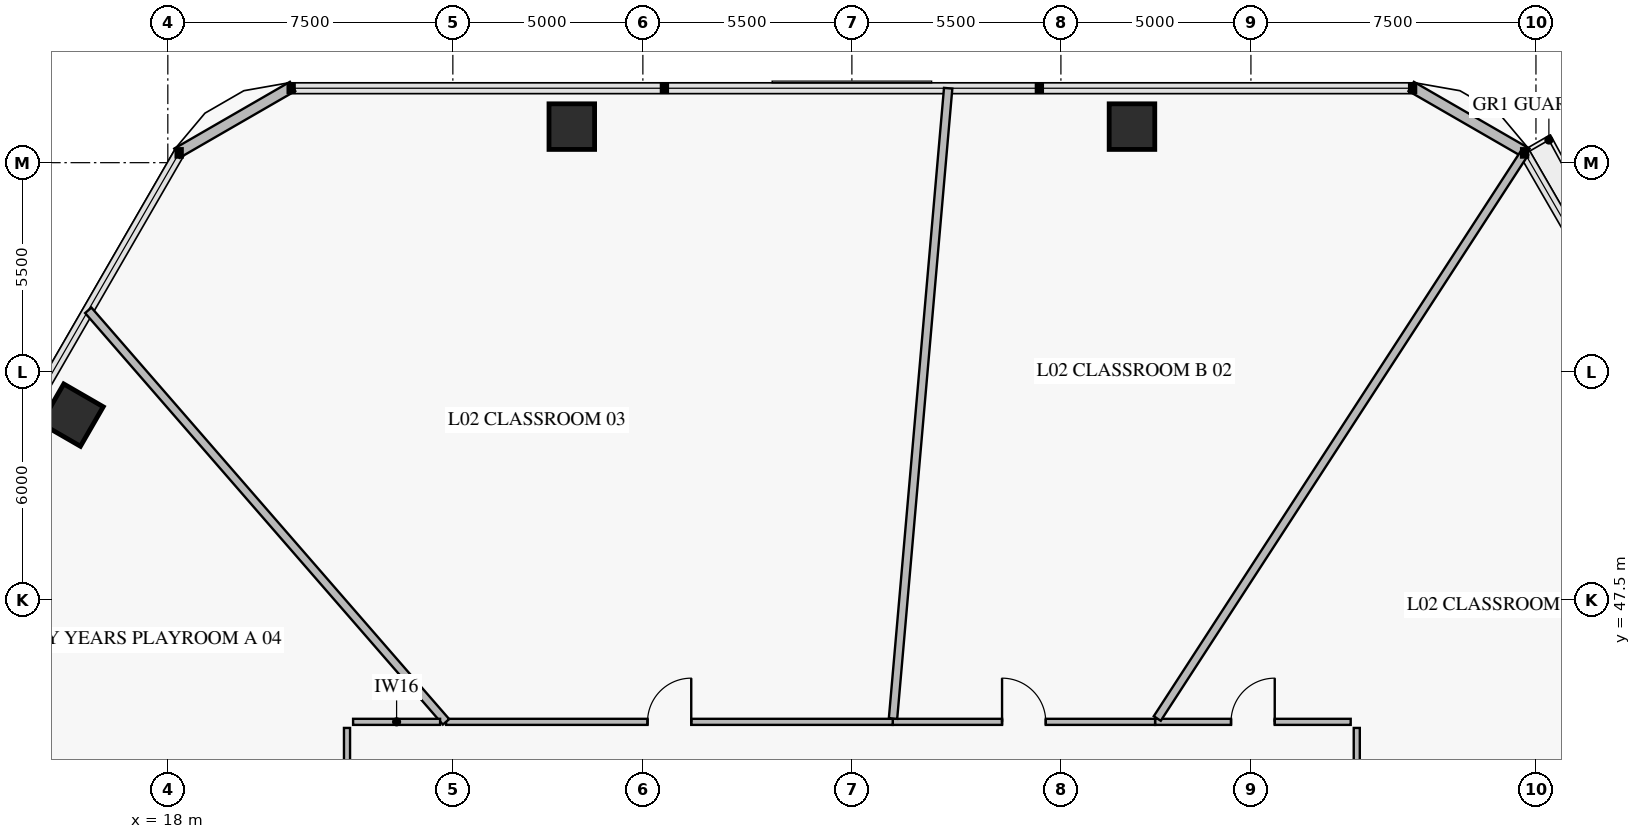
"""IFC4 building model, lengths in metres.
Left out: names, types, materials, properties, quantities, classifications, styles, units other than length and angle.
Written with IfcOpenShell. Run it as: python <this file> out.ifc"""

import sys

from ifc_helpers import new_model, si_unit, direction, frame, frame_2d, origin, origin_2d, place, context, subcontext, project, spatial, rectangle, extrude, element, fill, save


model = new_model("IFC4")
c1 = context("Model", 3, precision=1e-05, world=origin(), true_north=direction((0.0, 1.0)))
c2 = subcontext(c1, "Body", "Model", "MODEL_VIEW")
j1 = project(units=[si_unit("LENGTHUNIT", "METRE"), si_unit("PLANEANGLEUNIT", "RADIAN")], contexts=[c1])
p1 = place(None, origin())
s1 = spatial("IfcSite", under=j1, at=p1, CompositionType="ELEMENT")
p2 = place(p1, origin())
s2 = spatial("IfcBuilding", under=s1, at=p2, CompositionType="ELEMENT")
p3 = place(p2, frame((0.0, 0.0, 7.8)))
s3 = spatial("IfcBuildingStorey", under=s2, at=p3, CompositionType="ELEMENT", Elevation=7.8)
for number, where, z_axis, x_axis in (
    (1, (43.37, 59.948, 0.0), (0.0, 0.0, 1.0), (-1.0, 0.0, 0.0)),
    (2, (28.63, 59.948, 0.0), (0.0, 0.0, 1.0), (-1.0, 0.0, 0.0)),
    (3, (15.481, 52.357, 0.0), (0.0, 0.0, 1.0), (-0.5, -0.866, 0.0)),
):
    element("IfcColumn", number, at=place(p3, frame(where, z_axis=z_axis, x_axis=x_axis)), inside=s3, PredefinedType="COLUMN", context=c2, shape_type="SweptSolid", body=[
        extrude(rectangle(XDim=1.2, YDim=1.2, at=origin_2d()), origin(), (0.0, 0.0, 1.0), 3.92),
    ])
for number, where, z_axis, x_axis in (
    (4, (18.239, 59.249, 0.0), (0.0, 0.0, 1.0), (0.866, 0.5, 0.0)),
    (5, (50.717, 61.006, 0.0), (0.0, 0.0, 1.0), (0.866, -0.5, 0.0)),
):
    element("IfcWall", number, at=place(p3, frame(where, z_axis=z_axis, x_axis=x_axis)), inside=s3, PredefinedType="SOLIDWALL", context=c2, shape_type="SweptSolid", body=[
        extrude(rectangle(XDim=3.515, YDim=0.28, at=frame_2d((1.757, 0.0))), origin(), (0.0, 0.0, 1.0), 3.92),
    ])
p4 = place(p3, frame((49.125, 44.285, 0.0), z_axis=(0.0, 0.0, 1.0), x_axis=(-1.0, 0.0, 0.0)))
e6 = element("IfcWall", 6, at=p4, inside=s3, PredefinedType="PARTITIONING", context=c2, shape_type="SweptSolid", body=[
    extrude(rectangle(XDim=5.147, YDim=0.16, at=frame_2d((2.573, 0.0))), origin(), (0.0, 0.0, 1.0), 3.22),
])
p5 = place(p4, frame((1.999, 0.0, 0.0)))
e7 = element("IfcOpeningElement", 7, at=p5, cuts=e6, PredefinedType="OPENING", context=c2, shape_type="SweptSolid", body=[
    extrude(rectangle(XDim=1.15, YDim=2.2, at=frame_2d((0.575, 1.1))), frame((0.0, 0.092, 0.0), z_axis=(0.0, -1.0, 0.0), x_axis=(1.0, 0.0, 0.0)), (0.0, 0.0, 1.0), 0.184),
])
p6 = place(p3, frame((43.978, 44.285, 0.0), z_axis=(0.0, 0.0, 1.0), x_axis=(-1.0, 0.0, 0.0)))
e8 = element("IfcWall", 8, at=p6, inside=s3, PredefinedType="PARTITIONING", context=c2, shape_type="SweptSolid", body=[
    extrude(rectangle(XDim=6.903, YDim=0.16, at=frame_2d((3.452, 0.0))), origin(), (0.0, 0.0, 1.0), 3.22),
])
p7 = place(p6, frame((2.877, 0.0, 0.0)))
e9 = element("IfcOpeningElement", 9, at=p7, cuts=e8, PredefinedType="OPENING", context=c2, shape_type="SweptSolid", body=[
    extrude(rectangle(XDim=1.15, YDim=2.2, at=frame_2d((0.575, 1.1))), frame((0.0, 0.092, 0.0), z_axis=(0.0, -1.0, 0.0), x_axis=(1.0, 0.0, 0.0)), (0.0, 0.0, 1.0), 0.184),
])
p8 = place(p3, frame((37.075, 44.285, 0.0), z_axis=(0.0, 0.0, 1.0), x_axis=(-1.0, 0.0, 0.0)))
e10 = element("IfcWall", 10, at=p8, inside=s3, PredefinedType="PARTITIONING", context=c2, shape_type="SweptSolid", body=[
    extrude(rectangle(XDim=11.754, YDim=0.16, at=frame_2d((5.877, 0.0))), origin(), (0.0, 0.0, 1.0), 3.22),
])
p9 = place(p8, frame((5.302, 0.0, 0.0)))
e11 = element("IfcOpeningElement", 11, at=p9, cuts=e10, PredefinedType="OPENING", context=c2, shape_type="SweptSolid", body=[
    extrude(rectangle(XDim=1.15, YDim=2.2, at=frame_2d((0.575, 1.1))), frame((0.0, 0.092, 0.0), z_axis=(0.0, -1.0, 0.0), x_axis=(1.0, 0.0, 0.0)), (0.0, 0.0, 1.0), 0.184),
])
p10 = place(p3, frame((22.715, 44.125, 0.0), z_axis=(0.0, 0.0, 1.0), x_axis=(0.0, -1.0, 0.0)))
e12 = element("IfcWall", 12, at=p10, inside=s3, PredefinedType="PARTITIONING", context=c2, shape_type="SweptSolid", body=[
    extrude(rectangle(XDim=5.93, YDim=0.16, at=frame_2d((2.965, 0.0))), origin(), (0.0, 0.0, 1.0), 3.92),
])
p11 = place(p10, frame((2.39, 0.0, 0.0)))
e13 = element("IfcOpeningElement", 13, at=p11, cuts=e12, PredefinedType="OPENING", context=c2, shape_type="SweptSolid", body=[
    extrude(rectangle(XDim=1.15, YDim=2.2, at=frame_2d((0.575, 1.1))), frame((0.0, 0.092, 0.0), z_axis=(0.0, -1.0, 0.0), x_axis=(1.0, 0.0, 0.0)), (0.0, 0.0, 1.0), 0.184),
])
p12 = place(p3, frame((53.493, 41.697, 0.0), z_axis=(0.0, 0.0, 1.0), x_axis=(0.874622025543, 0.484805437711, 0.0)))
e14 = element("IfcWall", 14, at=p12, inside=s3, PredefinedType="PARTITIONING", context=c2, shape_type="SweptSolid", body=[
    extrude(rectangle(XDim=8.962, YDim=0.22, at=frame_2d((4.481, 0.0))), origin(), (0.0, 0.0, 1.0), 3.17),
])
p13 = place(p3, frame((44.035, 44.373, 0.0), z_axis=(0.0, 0.0, 1.0), x_axis=(0.544634848015, 0.838673287, 0.0)))
e15 = element("IfcWall", 15, at=p13, inside=s3, PredefinedType="PARTITIONING", context=c2, shape_type="SweptSolid", body=[
    extrude(rectangle(XDim=17.748, YDim=0.22, at=frame_2d((8.874, 0.0))), origin(), (0.0, 0.0, 1.0), 3.17),
])
p14 = place(p3, frame((49.285, 39.499, 0.0), z_axis=(0.0, 0.0, 1.0), x_axis=(0.0, 1.0, 0.0)))
e16 = element("IfcWall", 16, at=p14, inside=s3, PredefinedType="PARTITIONING", context=c2, shape_type="SweptSolid", body=[
    extrude(rectangle(XDim=4.626, YDim=0.16, at=frame_2d((2.313, 0.0))), origin(), (0.0, 0.0, 1.0), 3.92),
])
p15 = place(p3, frame((37.083, 44.373, 0.0), z_axis=(0.0, 0.0, 1.0), x_axis=(0.087149123156, 0.996195277209, 0.0)))
e17 = element("IfcWall", 17, at=p15, inside=s3, PredefinedType="PARTITIONING", context=c2, shape_type="SweptSolid", body=[
    extrude(rectangle(XDim=16.649, YDim=0.22, at=frame_2d((8.324, 0.0))), origin(), (0.0, 0.0, 1.0), 3.17),
])
p16 = place(p3, frame((25.321, 44.285, 0.0), z_axis=(0.0, 0.0, 1.0), x_axis=(-0.656060762546, 0.754708073263, 0.0)))
e18 = element("IfcWall", 18, at=p16, inside=s3, PredefinedType="PARTITIONING", context=c2, shape_type="SweptSolid", body=[
    extrude(rectangle(XDim=14.349, YDim=0.22, at=frame_2d((7.175, 0.0))), origin(), (0.0, 0.0, 1.0), 3.17),
])
p17 = place(p3, frame((22.627, 38.236, 0.0), z_axis=(0.0, 0.0, 1.0), x_axis=(-0.906309468756, 0.422614655263, 0.0)))
e19 = element("IfcWall", 19, at=p17, inside=s3, PredefinedType="PARTITIONING", context=c2, shape_type="SweptSolid", body=[
    extrude(rectangle(XDim=14.313, YDim=0.22, at=frame_2d((7.157, 0.0))), origin(), (0.0, 0.0, 1.0), 3.17),
])
p18 = place(p3, frame((25.164, 44.285, 0.0), z_axis=(0.0, 0.0, 1.0), x_axis=(-1.0, 0.0, 0.0)))
e20 = element("IfcWall", 20, at=p18, inside=s3, PredefinedType="PARTITIONING", context=c2, shape_type="SweptSolid", body=[
    extrude(rectangle(XDim=2.289, YDim=0.16, at=frame_2d((1.145, 0.0))), origin(), (0.0, 0.0, 1.0), 3.22),
])
p19 = place(p5, frame((1.15, 0.0, 0.0), z_axis=(0.0, 0.0, 1.0), x_axis=(-1.0, 0.0, 0.0)))
e21 = element("IfcDoor", 21, at=p19, inside=s3, OperationType="SINGLE_SWING_RIGHT", PredefinedType="DOOR", context=c2, shape_type="SweptSolid", body=[
    extrude(rectangle(XDim=1.15, YDim=2.2, at=frame_2d((0.575, 1.1))), frame((0.0, 0.025, 0.0), z_axis=(0.0, -1.0, 0.0), x_axis=(1.0, 0.0, 0.0)), (0.0, 0.0, 1.0), 0.05),
])
fill(e7, e21)
p20 = place(p7, frame((1.15, 0.0, 0.0), z_axis=(0.0, 0.0, 1.0), x_axis=(-1.0, 0.0, 0.0)))
e22 = element("IfcDoor", 22, at=p20, inside=s3, OperationType="SINGLE_SWING_LEFT", PredefinedType="DOOR", context=c2, shape_type="SweptSolid", body=[
    extrude(rectangle(XDim=1.15, YDim=2.2, at=frame_2d((0.575, 1.1))), frame((0.0, 0.025, 0.0), z_axis=(0.0, -1.0, 0.0), x_axis=(1.0, 0.0, 0.0)), (0.0, 0.0, 1.0), 0.05),
])
fill(e9, e22)
p21 = place(p9, frame((1.15, 0.0, 0.0), z_axis=(0.0, 0.0, 1.0), x_axis=(-1.0, 0.0, 0.0)))
e23 = element("IfcDoor", 23, at=p21, inside=s3, OperationType="SINGLE_SWING_RIGHT", PredefinedType="DOOR", context=c2, shape_type="SweptSolid", body=[
    extrude(rectangle(XDim=1.15, YDim=2.2, at=frame_2d((0.575, 1.1))), frame((0.0, 0.025, 0.0), z_axis=(0.0, -1.0, 0.0), x_axis=(1.0, 0.0, 0.0)), (0.0, 0.0, 1.0), 0.05),
])
fill(e11, e23)
save(model, sys.argv[1])
